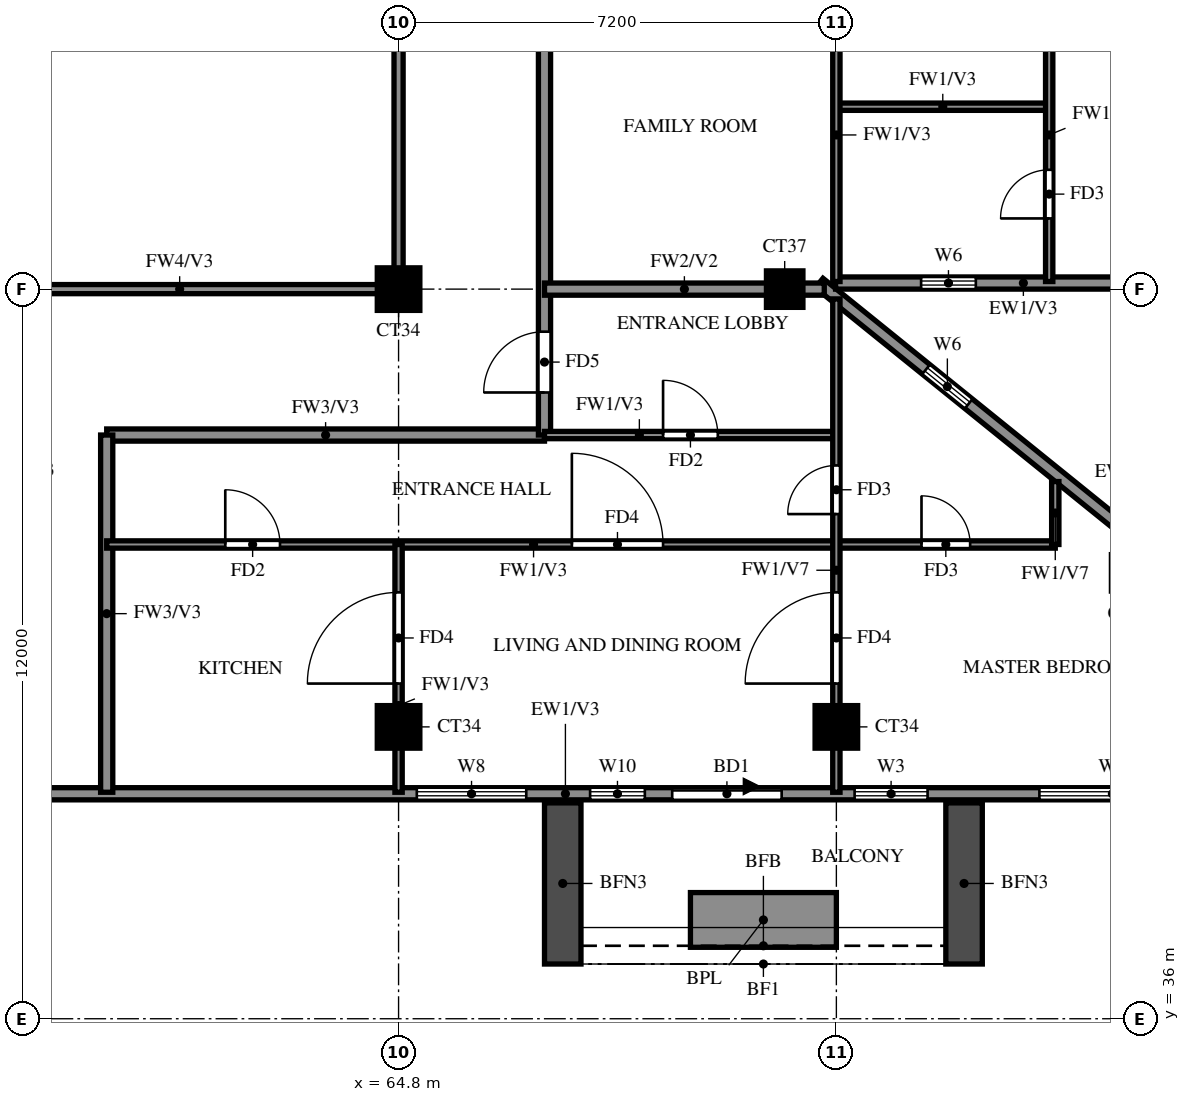
"""IFC4 building model, lengths in metres.
Left out: names, types, materials, properties, quantities, classifications, styles, units other than length and angle.
Written with IfcOpenShell. Run it as: python <this file> out.ifc"""

import sys

from ifc_helpers import new_model, si_unit, direction, frame, frame_2d, origin, origin_2d, place, context, subcontext, project, spatial, rectangle, extrude, source, transform, mapped, element, fill, save


model = new_model("IFC4")
c1 = context("Model", 3, precision=1e-05, world=origin(), true_north=direction((0.0, 1.0)))
c2 = subcontext(c1, "Body", "Model", "MODEL_VIEW")
j1 = project(units=[si_unit("LENGTHUNIT", "METRE"), si_unit("PLANEANGLEUNIT", "RADIAN")], contexts=[c1])
p1 = place(None, origin())
s1 = spatial("IfcSite", under=j1, at=p1, CompositionType="ELEMENT")
p2 = place(p1, origin())
s2 = spatial("IfcBuilding", under=s1, at=p2, CompositionType="ELEMENT")
p3 = place(p2, frame((0.0, 0.0, 264.0)))
s3 = spatial("IfcBuildingStorey", under=s2, at=p3, CompositionType="ELEMENT", Elevation=264.0)
m1 = source(origin(), c2, "Body", "SweptSolid", [
    extrude(rectangle(XDim=0.7, YDim=0.7, at=origin_2d()), origin(), (0.0, 0.0, 1.0), 3.22),
])
for number, where, z_axis, x_axis in (
    (1, (64.8, 40.8, 0.0), (0.0, 0.0, 1.0), (1.0, 0.0, 0.0)),
    (2, (72.0, 40.8, 0.0), (0.0, 0.0, 1.0), (1.0, 0.0, 0.0)),
    (3, (64.8, 48.0, 0.0), (0.0, 0.0, 1.0), (1.0, 0.0, 0.0)),
):
    element("IfcColumn", number, at=place(p3, frame(where, z_axis=z_axis, x_axis=x_axis)), inside=s3, PredefinedType="COLUMN", context=c2, shape_type="MappedRepresentation", body=[
        mapped(m1, transform((0.0, 0.0, 0.0))),
    ])
m2 = source(origin(), c2, "Body", "SweptSolid", [
    extrude(rectangle(XDim=0.6, YDim=0.6, at=origin_2d()), origin(), (0.0, 0.0, 1.0), 3.22),
])
p4 = place(p3, frame((71.15, 48.0, 0.0), z_axis=(0.0, 0.0, 1.0), x_axis=(1.0, 0.0, 0.0)))
e4 = element("IfcColumn", 4, at=p4, inside=s3, PredefinedType="COLUMN", context=c2, shape_type="MappedRepresentation", body=[
    mapped(m2, transform((0.0, 0.0, 0.0))),
])
p5 = place(p3, frame((81.907, 39.87, 0.0), z_axis=(0.0, 0.0, 1.0), x_axis=(-0.777936274417, 0.62834318087, 0.0)))
e5 = element("IfcWall", 5, at=p5, inside=s3, PredefinedType="SOLIDWALL", context=c2, shape_type="SweptSolid", body=[
    extrude(rectangle(XDim=13.099, YDim=0.2, at=frame_2d((6.549, 0.0))), origin(), (0.0, 0.0, 1.0), 3.22),
])
p6 = place(p5, frame((9.938, 0.0, 1.5)))
e6 = element("IfcOpeningElement", 6, at=p6, cuts=e5, PredefinedType="OPENING", context=c2, shape_type="SweptSolid", body=[
    extrude(rectangle(XDim=0.9, YDim=0.9, at=frame_2d((0.45, 0.45))), frame((0.0, 0.11, 0.0), z_axis=(0.0, -1.0, 0.0), x_axis=(1.0, 0.0, 0.0)), (0.0, 0.0, 1.0), 0.22),
])
p7 = place(p3, frame((71.987, 48.1, 0.0), z_axis=(0.0, 0.0, 1.0), x_axis=(1.0, 0.0, 0.0)))
e7 = element("IfcWall", 7, at=p7, inside=s3, PredefinedType="SOLIDWALL", context=c2, shape_type="SweptSolid", body=[
    extrude(rectangle(XDim=6.863, YDim=0.2, at=frame_2d((3.432, 0.0))), origin(), (0.0, 0.0, 1.0), 3.22),
])
p8 = place(p7, frame((1.406, 0.0, 1.5)))
e8 = element("IfcOpeningElement", 8, at=p8, cuts=e7, PredefinedType="OPENING", context=c2, shape_type="SweptSolid", body=[
    extrude(rectangle(XDim=0.9, YDim=0.9, at=frame_2d((0.45, 0.45))), frame((0.0, 0.11, 0.0), z_axis=(0.0, -1.0, 0.0), x_axis=(1.0, 0.0, 0.0)), (0.0, 0.0, 1.0), 0.22),
])
p9 = place(p3, frame((58.8, 39.7, 0.0), z_axis=(0.0, 0.0, 1.0), x_axis=(1.0, 0.0, 0.0)))
e9 = element("IfcWall", 9, at=p9, inside=s3, PredefinedType="SOLIDWALL", context=c2, shape_type="SweptSolid", body=[
    extrude(rectangle(XDim=23.317, YDim=0.2, at=frame_2d((11.658, 0.0))), origin(), (0.0, 0.0, 1.0), 3.22),
])
p10 = place(p9, frame((10.5, 0.0, 0.0)))
e10 = element("IfcOpeningElement", 10, at=p10, cuts=e9, PredefinedType="OPENING", context=c2, shape_type="SweptSolid", body=[
    extrude(rectangle(XDim=1.8, YDim=2.4, at=frame_2d((0.9, 1.2))), frame((0.0, 0.11, 0.0), z_axis=(0.0, -1.0, 0.0), x_axis=(1.0, 0.0, 0.0)), (0.0, 0.0, 1.0), 0.22),
])
p11 = place(p9, frame((6.3, 0.0, 0.6)))
e11 = element("IfcOpeningElement", 11, at=p11, cuts=e9, PredefinedType="OPENING", context=c2, shape_type="SweptSolid", body=[
    extrude(rectangle(XDim=1.8, YDim=2.4, at=frame_2d((0.9, 1.2))), frame((0.0, 0.11, 0.0), z_axis=(0.0, -1.0, 0.0), x_axis=(1.0, 0.0, 0.0)), (0.0, 0.0, 1.0), 0.22),
])
p12 = place(p9, frame((9.15, 0.0, 0.6)))
e12 = element("IfcOpeningElement", 12, at=p12, cuts=e9, PredefinedType="OPENING", context=c2, shape_type="SweptSolid", body=[
    extrude(rectangle(XDim=0.9, YDim=2.4, at=frame_2d((0.45, 1.2))), frame((0.0, 0.11, 0.0), z_axis=(0.0, -1.0, 0.0), x_axis=(1.0, 0.0, 0.0)), (0.0, 0.0, 1.0), 0.22),
])
p13 = place(p9, frame((13.5, 0.0, 0.6)))
e13 = element("IfcOpeningElement", 13, at=p13, cuts=e9, PredefinedType="OPENING", context=c2, shape_type="SweptSolid", body=[
    extrude(rectangle(XDim=1.2, YDim=2.4, at=frame_2d((0.6, 1.2))), frame((0.0, 0.11, 0.0), z_axis=(0.0, -1.0, 0.0), x_axis=(1.0, 0.0, 0.0)), (0.0, 0.0, 1.0), 0.22),
])
p14 = place(p9, frame((16.539, 0.0, 0.6)))
e14 = element("IfcOpeningElement", 14, at=p14, cuts=e9, PredefinedType="OPENING", context=c2, shape_type="SweptSolid", body=[
    extrude(rectangle(XDim=2.4, YDim=2.4, at=frame_2d((1.2, 1.2))), frame((0.0, 0.11, 0.0), z_axis=(0.0, -1.0, 0.0), x_axis=(1.0, 0.0, 0.0)), (0.0, 0.0, 1.0), 0.22),
])
p15 = place(p9, frame((19.778, 0.0, 0.6)))
e15 = element("IfcOpeningElement", 15, at=p15, cuts=e9, PredefinedType="OPENING", context=c2, shape_type="SweptSolid", body=[
    extrude(rectangle(XDim=2.4, YDim=2.4, at=frame_2d((1.2, 1.2))), frame((0.0, 0.11, 0.0), z_axis=(0.0, -1.0, 0.0), x_axis=(1.0, 0.0, 0.0)), (0.0, 0.0, 1.0), 0.22),
])
for number, where, z_axis, x_axis in (
    (16, (67.5, 39.55, 0.0), (0.0, 0.0, 1.0), (0.0, -1.0, 0.0)),
    (17, (74.1, 39.55, 0.0), (0.0, 0.0, 1.0), (0.0, -1.0, 0.0)),
):
    element("IfcWall", number, at=place(p3, frame(where, z_axis=z_axis, x_axis=x_axis)), inside=s3, PredefinedType="SOLIDWALL", context=c2, shape_type="SweptSolid", body=[
        extrude(rectangle(XDim=2.65, YDim=0.6, at=frame_2d((1.325, 0.0))), origin(), (0.0, 0.0, 1.0), 2.85),
    ])
p16 = place(p3, frame((69.6, 37.625, 0.0), z_axis=(0.0, 0.0, 1.0), x_axis=(1.0, 0.0, 0.0)))
e18 = element("IfcWall", 18, at=p16, inside=s3, PredefinedType="SOLIDWALL", context=c2, shape_type="SweptSolid", body=[
    extrude(rectangle(XDim=2.4, YDim=0.9, at=frame_2d((1.2, 0.0))), origin(), (0.0, 0.0, 1.0), 0.9),
])
p17 = place(p3, frame((60.0, 45.6, 0.0), z_axis=(0.0, 0.0, 1.0), x_axis=(1.0, 0.0, 0.0)))
e19 = element("IfcWall", 19, at=p17, inside=s3, PredefinedType="SOLIDWALL", context=c2, shape_type="SweptSolid", body=[
    extrude(rectangle(XDim=7.2, YDim=0.2, at=frame_2d((3.6, 0.0))), origin(), (0.0, 0.0, 1.0), 3.22),
])
p18 = place(p3, frame((60.0, 39.725, 0.0), z_axis=(0.0, 0.0, 1.0), x_axis=(0.0, 1.0, 0.0)))
e20 = element("IfcWall", 20, at=p18, inside=s3, PredefinedType="SOLIDWALL", context=c2, shape_type="SweptSolid", body=[
    extrude(rectangle(XDim=5.875, YDim=0.2, at=frame_2d((2.938, 0.0))), origin(), (0.0, 0.0, 1.0), 3.22),
])
p19 = place(p3, frame((67.2, 45.6, 0.0), z_axis=(0.0, 0.0, 1.0), x_axis=(0.0, 1.0, 0.0)))
e21 = element("IfcWall", 21, at=p19, inside=s3, PredefinedType="SOLIDWALL", context=c2, shape_type="SweptSolid", body=[
    extrude(rectangle(XDim=16.8, YDim=0.2, at=frame_2d((8.4, 0.0))), origin(), (0.0, 0.0, 1.0), 3.22),
])
p20 = place(p19, frame((8.3, 0.0, 0.0)))
e22 = element("IfcOpeningElement", 22, at=p20, cuts=e21, PredefinedType="OPENING", context=c2, shape_type="SweptSolid", body=[
    extrude(rectangle(XDim=1.0, YDim=2.1, at=frame_2d((0.5, 1.05))), frame((0.0, 0.11, 0.0), z_axis=(0.0, -1.0, 0.0), x_axis=(1.0, 0.0, 0.0)), (0.0, 0.0, 1.0), 0.22),
])
p21 = place(p19, frame((15.1, 0.0, 0.0)))
e23 = element("IfcOpeningElement", 23, at=p21, cuts=e21, PredefinedType="OPENING", context=c2, shape_type="SweptSolid", body=[
    extrude(rectangle(XDim=1.0, YDim=2.1, at=frame_2d((0.5, 1.05))), frame((0.0, 0.11, 0.0), z_axis=(0.0, -1.0, 0.0), x_axis=(1.0, 0.0, 0.0)), (0.0, 0.0, 1.0), 0.22),
])
p22 = place(p19, frame((0.7, 0.0, 0.0)))
e24 = element("IfcOpeningElement", 24, at=p22, cuts=e21, PredefinedType="OPENING", context=c2, shape_type="SweptSolid", body=[
    extrude(rectangle(XDim=1.0, YDim=2.1, at=frame_2d((0.5, 1.05))), frame((0.0, 0.11, 0.0), z_axis=(0.0, -1.0, 0.0), x_axis=(1.0, 0.0, 0.0)), (0.0, 0.0, 1.0), 0.22),
])
p23 = place(p3, frame((67.2, 48.0, 0.0), z_axis=(0.0, 0.0, 1.0), x_axis=(1.0, 0.0, 0.0)))
e25 = element("IfcWall", 25, at=p23, inside=s3, PredefinedType="SOLIDWALL", context=c2, shape_type="SweptSolid", body=[
    extrude(rectangle(XDim=4.601, YDim=0.2, at=frame_2d((2.301, 0.0))), origin(), (0.0, 0.0, 1.0), 3.22),
])
p24 = place(p3, frame((60.0, 43.8, 0.0), z_axis=(0.0, 0.0, 1.0), x_axis=(1.0, 0.0, 0.0)))
e26 = element("IfcWall", 26, at=p24, inside=s3, PredefinedType="PARTITIONING", context=c2, shape_type="SweptSolid", body=[
    extrude(rectangle(XDim=15.6, YDim=0.12, at=frame_2d((7.8, 0.0))), origin(), (0.0, 0.0, 1.0), 3.22),
])
p25 = place(p24, frame((7.65, 0.0, 0.0)))
e27 = element("IfcOpeningElement", 27, at=p25, cuts=e26, PredefinedType="OPENING", context=c2, shape_type="SweptSolid", body=[
    extrude(rectangle(XDim=1.5, YDim=2.1, at=frame_2d((0.75, 1.05))), frame((0.0, 0.07, 0.0), z_axis=(0.0, -1.0, 0.0), x_axis=(1.0, 0.0, 0.0)), (0.0, 0.0, 1.0), 0.14),
])
p26 = place(p24, frame((1.95, 0.0, 0.0)))
e28 = element("IfcOpeningElement", 28, at=p26, cuts=e26, PredefinedType="OPENING", context=c2, shape_type="SweptSolid", body=[
    extrude(rectangle(XDim=0.9, YDim=2.1, at=frame_2d((0.45, 1.05))), frame((0.0, 0.07, 0.0), z_axis=(0.0, -1.0, 0.0), x_axis=(1.0, 0.0, 0.0)), (0.0, 0.0, 1.0), 0.14),
])
p27 = place(p24, frame((13.4, 0.0, 0.0)))
e29 = element("IfcOpeningElement", 29, at=p27, cuts=e26, PredefinedType="OPENING", context=c2, shape_type="SweptSolid", body=[
    extrude(rectangle(XDim=0.8, YDim=2.1, at=frame_2d((0.4, 1.05))), frame((0.0, 0.07, 0.0), z_axis=(0.0, -1.0, 0.0), x_axis=(1.0, 0.0, 0.0)), (0.0, 0.0, 1.0), 0.14),
])
p28 = place(p3, frame((67.2, 45.6, 0.0), z_axis=(0.0, 0.0, 1.0), x_axis=(1.0, 0.0, 0.0)))
e30 = element("IfcWall", 30, at=p28, inside=s3, PredefinedType="PARTITIONING", context=c2, shape_type="SweptSolid", body=[
    extrude(rectangle(XDim=4.8, YDim=0.12, at=frame_2d((2.4, 0.0))), origin(), (0.0, 0.0, 1.0), 3.22),
])
p29 = place(p28, frame((1.95, 0.0, 0.0)))
e31 = element("IfcOpeningElement", 31, at=p29, cuts=e30, PredefinedType="OPENING", context=c2, shape_type="SweptSolid", body=[
    extrude(rectangle(XDim=0.9, YDim=2.1, at=frame_2d((0.45, 1.05))), frame((0.0, 0.07, 0.0), z_axis=(0.0, -1.0, 0.0), x_axis=(1.0, 0.0, 0.0)), (0.0, 0.0, 1.0), 0.14),
])
p30 = place(p3, frame((72.0, 51.0, 0.0), z_axis=(0.0, 0.0, 1.0), x_axis=(1.0, 0.0, 0.0)))
e32 = element("IfcWall", 32, at=p30, inside=s3, PredefinedType="PARTITIONING", context=c2, shape_type="SweptSolid", body=[
    extrude(rectangle(XDim=3.5, YDim=0.12, at=frame_2d((1.75, 0.0))), origin(), (0.0, 0.0, 1.0), 3.22),
])
p31 = place(p3, frame((64.8, 39.725, 0.0), z_axis=(0.0, 0.0, 1.0), x_axis=(0.0, 1.0, 0.0)))
e33 = element("IfcWall", 33, at=p31, inside=s3, PredefinedType="PARTITIONING", context=c2, shape_type="SweptSolid", body=[
    extrude(rectangle(XDim=4.075, YDim=0.12, at=frame_2d((2.038, 0.0))), origin(), (0.0, 0.0, 1.0), 3.22),
])
p32 = place(p31, frame((1.788, 0.0, 0.0)))
e34 = element("IfcOpeningElement", 34, at=p32, cuts=e33, PredefinedType="OPENING", context=c2, shape_type="SweptSolid", body=[
    extrude(rectangle(XDim=1.5, YDim=2.1, at=frame_2d((0.75, 1.05))), frame((0.0, 0.07, 0.0), z_axis=(0.0, -1.0, 0.0), x_axis=(1.0, 0.0, 0.0)), (0.0, 0.0, 1.0), 0.14),
])
p33 = place(p3, frame((72.0, 39.725, 0.0), z_axis=(0.0, 0.0, 1.0), x_axis=(0.0, 1.0, 0.0)))
e35 = element("IfcWall", 35, at=p33, inside=s3, PredefinedType="PARTITIONING", context=c2, shape_type="SweptSolid", body=[
    extrude(rectangle(XDim=8.114, YDim=0.12, at=frame_2d((4.057, 0.0))), origin(), (0.0, 0.0, 1.0), 2.32),
])
p34 = place(p33, frame((1.788, 0.0, 0.0)))
e36 = element("IfcOpeningElement", 36, at=p34, cuts=e35, PredefinedType="OPENING", context=c2, shape_type="SweptSolid", body=[
    extrude(rectangle(XDim=1.5, YDim=2.1, at=frame_2d((0.75, 1.05))), frame((0.0, 0.07, 0.0), z_axis=(0.0, -1.0, 0.0), x_axis=(1.0, 0.0, 0.0)), (0.0, 0.0, 1.0), 0.14),
])
p35 = place(p33, frame((4.575, 0.0, 0.0)))
e37 = element("IfcOpeningElement", 37, at=p35, cuts=e35, PredefinedType="OPENING", context=c2, shape_type="SweptSolid", body=[
    extrude(rectangle(XDim=0.8, YDim=2.1, at=frame_2d((0.4, 1.05))), frame((0.0, 0.07, 0.0), z_axis=(0.0, -1.0, 0.0), x_axis=(1.0, 0.0, 0.0)), (0.0, 0.0, 1.0), 0.14),
])
p36 = place(p3, frame((72.0, 48.125, 0.0), z_axis=(0.0, 0.0, 1.0), x_axis=(0.0, 1.0, 0.0)))
e38 = element("IfcWall", 38, at=p36, inside=s3, PredefinedType="PARTITIONING", context=c2, shape_type="SweptSolid", body=[
    extrude(rectangle(XDim=5.075, YDim=0.12, at=frame_2d((2.538, 0.0))), origin(), (0.0, 0.0, 1.0), 3.22),
])
p37 = place(p3, frame((75.5, 48.125, 0.0), z_axis=(0.0, 0.0, 1.0), x_axis=(0.0, 1.0, 0.0)))
e39 = element("IfcWall", 39, at=p37, inside=s3, PredefinedType="PARTITIONING", context=c2, shape_type="SweptSolid", body=[
    extrude(rectangle(XDim=5.075, YDim=0.12, at=frame_2d((2.538, 0.0))), origin(), (0.0, 0.0, 1.0), 3.22),
])
p38 = place(p37, frame((1.038, 0.0, 0.0)))
e40 = element("IfcOpeningElement", 40, at=p38, cuts=e39, PredefinedType="OPENING", context=c2, shape_type="SweptSolid", body=[
    extrude(rectangle(XDim=0.8, YDim=2.1, at=frame_2d((0.4, 1.05))), frame((0.0, 0.07, 0.0), z_axis=(0.0, -1.0, 0.0), x_axis=(1.0, 0.0, 0.0)), (0.0, 0.0, 1.0), 0.14),
])
p39 = place(p3, frame((75.6, 43.8, 0.0), z_axis=(0.0, 0.0, 1.0), x_axis=(0.0, 1.0, 0.0)))
e41 = element("IfcWall", 41, at=p39, inside=s3, PredefinedType="PARTITIONING", context=c2, shape_type="SweptSolid", body=[
    extrude(rectangle(XDim=1.035, YDim=0.12, at=frame_2d((0.518, 0.0))), origin(), (0.0, 0.0, 1.0), 2.32),
])
p40 = place(p3, frame((57.6, 48.0, 0.0), z_axis=(0.0, 0.0, 1.0), x_axis=(1.0, 0.0, 0.0)))
e42 = element("IfcWall", 42, at=p40, inside=s3, PredefinedType="SOLIDWALL", context=c2, shape_type="SweptSolid", body=[
    extrude(rectangle(XDim=7.2, YDim=0.15, at=frame_2d((3.6, 0.0))), origin(), (0.0, 0.0, 1.0), 2.32),
])
p41 = place(p3, frame((64.8, 48.0, 0.0), z_axis=(0.0, 0.0, 1.0), x_axis=(0.0, 1.0, 0.0)))
e43 = element("IfcWall", 43, at=p41, inside=s3, PredefinedType="SOLIDWALL", context=c2, shape_type="SweptSolid", body=[
    extrude(rectangle(XDim=14.4, YDim=0.15, at=frame_2d((7.2, 0.0))), origin(), (0.0, 0.0, 1.0), 2.32),
])
p42 = place(p6, origin())
e44 = element("IfcWindow", 44, at=p42, inside=s3, PartitioningType="SINGLE_PANEL", PredefinedType="WINDOW", context=c2, shape_type="SweptSolid", body=[
    extrude(rectangle(XDim=0.9, YDim=0.9, at=frame_2d((0.45, 0.45))), frame((0.0, 0.03, 0.0), z_axis=(0.0, -1.0, 0.0), x_axis=(1.0, 0.0, 0.0)), (0.0, 0.0, 1.0), 0.06),
])
fill(e6, e44)
p43 = place(p8, origin())
e45 = element("IfcWindow", 45, at=p43, inside=s3, PartitioningType="SINGLE_PANEL", PredefinedType="WINDOW", context=c2, shape_type="SweptSolid", body=[
    extrude(rectangle(XDim=0.9, YDim=0.9, at=frame_2d((0.45, 0.45))), frame((0.0, 0.03, 0.0), z_axis=(0.0, -1.0, 0.0), x_axis=(1.0, 0.0, 0.0)), (0.0, 0.0, 1.0), 0.06),
])
fill(e8, e45)
p44 = place(p10, origin())
e46 = element("IfcDoor", 46, at=p44, inside=s3, OperationType="DOUBLE_DOOR_SLIDING", PredefinedType="DOOR", context=c2, shape_type="SweptSolid", body=[
    extrude(rectangle(XDim=1.8, YDim=2.4, at=frame_2d((0.9, 1.2))), frame((0.0, 0.025, 0.0), z_axis=(0.0, -1.0, 0.0), x_axis=(1.0, 0.0, 0.0)), (0.0, 0.0, 1.0), 0.05),
])
fill(e10, e46)
p45 = place(p11, origin())
e47 = element("IfcWindow", 47, at=p45, inside=s3, PartitioningType="DOUBLE_PANEL_VERTICAL", PredefinedType="WINDOW", context=c2, shape_type="SweptSolid", body=[
    extrude(rectangle(XDim=1.8, YDim=2.4, at=frame_2d((0.9, 1.2))), frame((0.0, 0.03, 0.0), z_axis=(0.0, -1.0, 0.0), x_axis=(1.0, 0.0, 0.0)), (0.0, 0.0, 1.0), 0.06),
])
fill(e11, e47)
p46 = place(p12, origin())
e48 = element("IfcWindow", 48, at=p46, inside=s3, PartitioningType="SINGLE_PANEL", PredefinedType="WINDOW", context=c2, shape_type="SweptSolid", body=[
    extrude(rectangle(XDim=0.9, YDim=2.4, at=frame_2d((0.45, 1.2))), frame((0.0, 0.03, 0.0), z_axis=(0.0, -1.0, 0.0), x_axis=(1.0, 0.0, 0.0)), (0.0, 0.0, 1.0), 0.06),
])
fill(e12, e48)
p47 = place(p13, origin())
e49 = element("IfcWindow", 49, at=p47, inside=s3, PartitioningType="SINGLE_PANEL", PredefinedType="WINDOW", context=c2, shape_type="SweptSolid", body=[
    extrude(rectangle(XDim=1.2, YDim=2.4, at=frame_2d((0.6, 1.2))), frame((0.0, 0.03, 0.0), z_axis=(0.0, -1.0, 0.0), x_axis=(1.0, 0.0, 0.0)), (0.0, 0.0, 1.0), 0.06),
])
fill(e13, e49)
p48 = place(p14, origin())
e50 = element("IfcWindow", 50, at=p48, inside=s3, PartitioningType="DOUBLE_PANEL_VERTICAL", PredefinedType="WINDOW", context=c2, shape_type="SweptSolid", body=[
    extrude(rectangle(XDim=2.4, YDim=2.4, at=frame_2d((1.2, 1.2))), frame((0.0, 0.03, 0.0), z_axis=(0.0, -1.0, 0.0), x_axis=(1.0, 0.0, 0.0)), (0.0, 0.0, 1.0), 0.06),
])
fill(e14, e50)
p49 = place(p38, origin())
e51 = element("IfcDoor", 51, at=p49, inside=s3, OperationType="SINGLE_SWING_RIGHT", PredefinedType="DOOR", context=c2, shape_type="SweptSolid", body=[
    extrude(rectangle(XDim=0.8, YDim=2.1, at=frame_2d((0.4, 1.05))), frame((0.0, 0.025, 0.0), z_axis=(0.0, -1.0, 0.0), x_axis=(1.0, 0.0, 0.0)), (0.0, 0.0, 1.0), 0.05),
])
fill(e40, e51)
p50 = place(p32, origin())
e52 = element("IfcDoor", 52, at=p50, inside=s3, OperationType="SINGLE_SWING_LEFT", PredefinedType="DOOR", context=c2, shape_type="SweptSolid", body=[
    extrude(rectangle(XDim=1.5, YDim=2.1, at=frame_2d((0.75, 1.05))), frame((0.0, 0.025, 0.0), z_axis=(0.0, -1.0, 0.0), x_axis=(1.0, 0.0, 0.0)), (0.0, 0.0, 1.0), 0.05),
])
fill(e34, e52)
p51 = place(p29, origin())
e53 = element("IfcDoor", 53, at=p51, inside=s3, OperationType="SINGLE_SWING_LEFT", PredefinedType="DOOR", context=c2, shape_type="SweptSolid", body=[
    extrude(rectangle(XDim=0.9, YDim=2.1, at=frame_2d((0.45, 1.05))), frame((0.0, 0.025, 0.0), z_axis=(0.0, -1.0, 0.0), x_axis=(1.0, 0.0, 0.0)), (0.0, 0.0, 1.0), 0.05),
])
fill(e31, e53)
p52 = place(p22, origin())
e54 = element("IfcDoor", 54, at=p52, inside=s3, OperationType="SINGLE_SWING_LEFT", PredefinedType="DOOR", context=c2, shape_type="SweptSolid", body=[
    extrude(rectangle(XDim=1.0, YDim=2.1, at=frame_2d((0.5, 1.05))), frame((0.0, 0.025, 0.0), z_axis=(0.0, -1.0, 0.0), x_axis=(1.0, 0.0, 0.0)), (0.0, 0.0, 1.0), 0.05),
])
fill(e24, e54)
p53 = place(p25, origin())
e55 = element("IfcDoor", 55, at=p53, inside=s3, OperationType="SINGLE_SWING_RIGHT", PredefinedType="DOOR", context=c2, shape_type="SweptSolid", body=[
    extrude(rectangle(XDim=1.5, YDim=2.1, at=frame_2d((0.75, 1.05))), frame((0.0, 0.025, 0.0), z_axis=(0.0, -1.0, 0.0), x_axis=(1.0, 0.0, 0.0)), (0.0, 0.0, 1.0), 0.05),
])
fill(e27, e55)
p54 = place(p26, origin())
e56 = element("IfcDoor", 56, at=p54, inside=s3, OperationType="SINGLE_SWING_LEFT", PredefinedType="DOOR", context=c2, shape_type="SweptSolid", body=[
    extrude(rectangle(XDim=0.9, YDim=2.1, at=frame_2d((0.45, 1.05))), frame((0.0, 0.025, 0.0), z_axis=(0.0, -1.0, 0.0), x_axis=(1.0, 0.0, 0.0)), (0.0, 0.0, 1.0), 0.05),
])
fill(e28, e56)
p55 = place(p34, origin())
e57 = element("IfcDoor", 57, at=p55, inside=s3, OperationType="SINGLE_SWING_RIGHT", PredefinedType="DOOR", context=c2, shape_type="SweptSolid", body=[
    extrude(rectangle(XDim=1.5, YDim=2.1, at=frame_2d((0.75, 1.05))), frame((0.0, 0.025, 0.0), z_axis=(0.0, -1.0, 0.0), x_axis=(1.0, 0.0, 0.0)), (0.0, 0.0, 1.0), 0.05),
])
fill(e36, e57)
p56 = place(p35, origin())
e58 = element("IfcDoor", 58, at=p56, inside=s3, OperationType="SINGLE_SWING_RIGHT", PredefinedType="DOOR", context=c2, shape_type="SweptSolid", body=[
    extrude(rectangle(XDim=0.8, YDim=2.1, at=frame_2d((0.4, 1.05))), frame((0.0, 0.025, 0.0), z_axis=(0.0, -1.0, 0.0), x_axis=(1.0, 0.0, 0.0)), (0.0, 0.0, 1.0), 0.05),
])
fill(e37, e58)
p57 = place(p27, origin())
e59 = element("IfcDoor", 59, at=p57, inside=s3, OperationType="SINGLE_SWING_LEFT", PredefinedType="DOOR", context=c2, shape_type="SweptSolid", body=[
    extrude(rectangle(XDim=0.8, YDim=2.1, at=frame_2d((0.4, 1.05))), frame((0.0, 0.025, 0.0), z_axis=(0.0, -1.0, 0.0), x_axis=(1.0, 0.0, 0.0)), (0.0, 0.0, 1.0), 0.05),
])
fill(e29, e59)
save(model, sys.argv[1])
